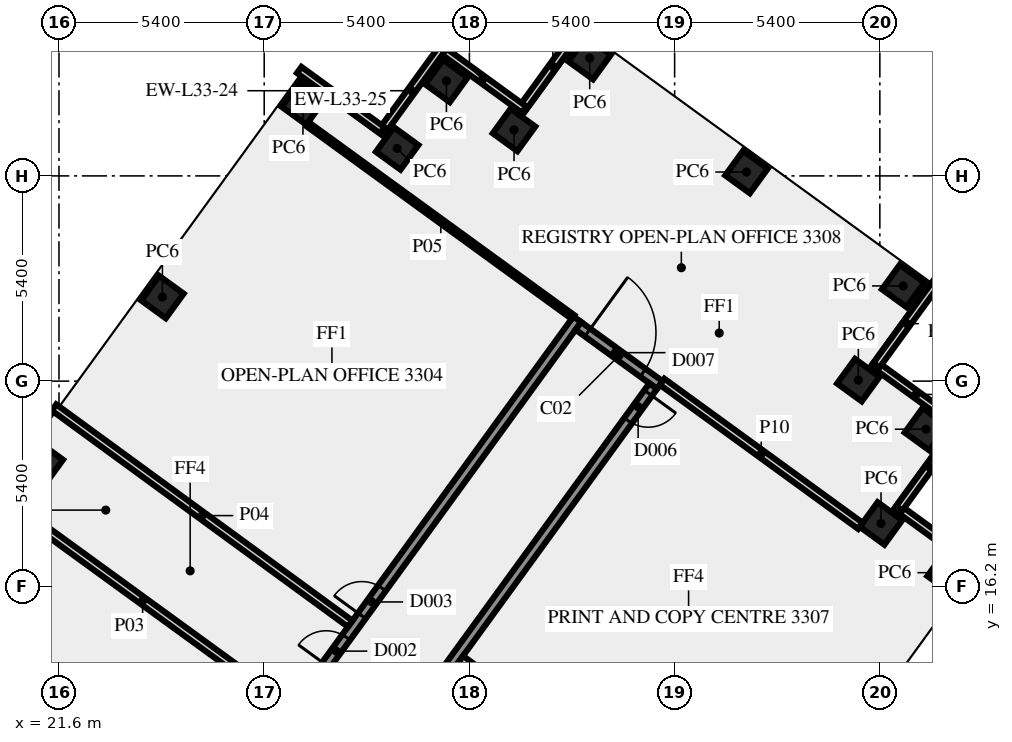
"""IFC4 building model, lengths in metres.
Left out: names, types, materials, properties, quantities, classifications, styles, units other than length and angle.
Written with IfcOpenShell. Run it as: python <this file> out.ifc"""

import sys

from ifc_helpers import new_model, si_unit, direction, frame, frame_2d, origin, origin_2d, place, context, subcontext, project, spatial, rectangle, extrude, element, fill, save


model = new_model("IFC4")
c1 = context("Model", 3, precision=1e-05, world=origin(), true_north=direction((0.0, 1.0)))
c2 = subcontext(c1, "Body", "Model", "MODEL_VIEW")
j1 = project(units=[si_unit("LENGTHUNIT", "METRE"), si_unit("PLANEANGLEUNIT", "RADIAN")], contexts=[c1])
p1 = place(None, origin())
s1 = spatial("IfcSite", under=j1, at=p1, CompositionType="ELEMENT")
p2 = place(p1, origin())
s2 = spatial("IfcBuilding", under=s1, at=p2, CompositionType="ELEMENT")
p3 = place(p2, frame((0.0, 0.0, 144.0)))
s3 = spatial("IfcBuildingStorey", under=s2, at=p3, CompositionType="ELEMENT", Elevation=144.0)
for number, where, z_axis, x_axis in (
    (1, (45.01, 16.56, 0.0), (0.0, 0.0, 1.0), (0.588, 0.809, 0.0)),
    (2, (43.231, 17.854, 0.0), (0.0, 0.0, 1.0), (0.588, 0.809, 0.0)),
    (3, (44.415, 20.335, 0.0), (0.0, 0.0, 1.0), (0.588, 0.809, 0.0)),
    (4, (42.635, 21.626, 0.0), (0.0, 0.0, 1.0), (-0.809, 0.588, 0.0)),
    (5, (43.815, 24.105, 0.0), (0.0, 0.0, 1.0), (-0.809, 0.588, 0.0)),
    (6, (39.691, 27.102, 0.0), (0.0, 0.0, 1.0), (-0.809, 0.588, 0.0)),
    (7, (35.565, 30.1, 0.0), (0.0, 0.0, 1.0), (-0.588, -0.809, 0.0)),
    (8, (33.574, 28.209, 0.0), (0.0, 0.0, 1.0), (-0.809, 0.588, 0.0)),
    (9, (31.795, 29.5, 0.0), (0.0, 0.0, 1.0), (-0.588, -0.809, 0.0)),
    (10, (30.499, 27.723, 0.0), (0.0, 0.0, 1.0), (-0.809, 0.588, 0.0)),
    (11, (28.02, 28.905, 0.0), (0.0, 0.0, 1.0), (-0.809, 0.588, 0.0)),
    (12, (24.321, 23.812, 0.0), (0.0, 0.0, 1.0), (-0.588, -0.809, 0.0)),
    (13, (21.147, 19.444, 0.0), (0.0, 0.0, 1.0), (-0.588, -0.809, 0.0)),
):
    element("IfcColumn", number, at=place(p3, frame(where, z_axis=z_axis, x_axis=x_axis)), inside=s3, PredefinedType="COLUMN", context=c2, shape_type="SweptSolid", body=[
        extrude(rectangle(XDim=0.8, YDim=0.8, at=origin_2d()), origin(), (0.0, 0.0, 1.0), 3.65),
    ])
for number, where, z_axis, x_axis in (
    (14, (45.842, 16.685, 0.0), (0.0, 0.0, 1.0), (-0.809, 0.588, 0.0)),
    (15, (43.709, 18.249, 0.0), (0.0, 0.0, 1.0), (0.588, 0.809, 0.0)),
    (16, (45.245, 20.456, 0.0), (0.0, 0.0, 1.0), (-0.809, 0.588, 0.0)),
    (17, (43.113, 22.02, 0.0), (0.0, 0.0, 1.0), (0.588, 0.809, 0.0)),
    (18, (35.388, 30.97, 0.0), (0.0, 0.0, 1.0), (-0.588, -0.809, 0.0)),
    (19, (33.838, 28.744, 0.0), (0.0, 0.0, 1.0), (-0.809, 0.588, 0.0)),
    (20, (31.67, 30.333, 0.0), (0.0, 0.0, 1.0), (-0.588, -0.809, 0.0)),
    (21, (30.106, 28.2, 0.0), (0.0, 0.0, 1.0), (-0.809, 0.588, 0.0)),
):
    element("IfcWall", number, at=place(p3, frame(where, z_axis=z_axis, x_axis=x_axis)), inside=s3, PredefinedType="SOLIDWALL", context=c2, shape_type="SweptSolid", body=[
        extrude(rectangle(XDim=2.7, YDim=0.2, at=frame_2d((1.35, 0.0))), origin(), (0.0, 0.0, 1.0), 3.65),
    ])
p4 = place(p3, frame((17.545, -1.125, 0.0), z_axis=(0.0, 0.0, 1.0), x_axis=(0.587786330937, 0.809016210693, 0.0)))
e22 = element("IfcWall", 22, at=p4, inside=s3, PredefinedType="SOLIDWALL", context=c2, shape_type="SweptSolid", body=[
    extrude(rectangle(XDim=30.103, YDim=0.25, at=frame_2d((15.052, 0.0))), origin(), (0.0, 0.0, 1.0), 3.65),
])
p5 = place(p4, frame((3.441, 0.0, 0.0)))
e23 = element("IfcOpeningElement", 23, at=p5, cuts=e22, PredefinedType="OPENING", context=c2, shape_type="SweptSolid", body=[
    extrude(rectangle(XDim=0.9, YDim=2.1, at=frame_2d((0.45, 1.05))), frame((0.0, 0.135, 0.0), z_axis=(0.0, -1.0, 0.0), x_axis=(1.0, 0.0, 0.0)), (0.0, 0.0, 1.0), 0.27),
])
p6 = place(p4, frame((20.457, 0.0, 0.0)))
e24 = element("IfcOpeningElement", 24, at=p6, cuts=e22, PredefinedType="OPENING", context=c2, shape_type="SweptSolid", body=[
    extrude(rectangle(XDim=0.9, YDim=2.1, at=frame_2d((0.45, 1.05))), frame((0.0, 0.135, 0.0), z_axis=(0.0, -1.0, 0.0), x_axis=(1.0, 0.0, 0.0)), (0.0, 0.0, 1.0), 0.27),
])
p7 = place(p4, frame((18.858, 0.0, 0.0)))
e25 = element("IfcOpeningElement", 25, at=p7, cuts=e22, PredefinedType="OPENING", context=c2, shape_type="SweptSolid", body=[
    extrude(rectangle(XDim=0.9, YDim=2.1, at=frame_2d((0.45, 1.05))), frame((0.0, 0.135, 0.0), z_axis=(0.0, -1.0, 0.0), x_axis=(1.0, 0.0, 0.0)), (0.0, 0.0, 1.0), 0.27),
])
p8 = place(p3, frame((35.267, 23.054, 0.0), z_axis=(0.0, 0.0, 1.0), x_axis=(0.809038743598, -0.587755315891, 0.0)))
e26 = element("IfcWall", 26, at=p8, inside=s3, PredefinedType="SOLIDWALL", context=c2, shape_type="SweptSolid", body=[
    extrude(rectangle(XDim=2.65, YDim=0.25, at=frame_2d((1.325, 0.0))), origin(), (0.0, 0.0, 1.0), 3.65),
])
p9 = place(p8, frame((0.3, 0.0, 0.0)))
e27 = element("IfcOpeningElement", 27, at=p9, cuts=e26, PredefinedType="OPENING", context=c2, shape_type="SweptSolid", body=[
    extrude(rectangle(XDim=1.8, YDim=2.1, at=frame_2d((0.9, 1.05))), frame((0.0, 0.135, 0.0), z_axis=(0.0, -1.0, 0.0), x_axis=(1.0, 0.0, 0.0)), (0.0, 0.0, 1.0), 0.27),
])
p10 = place(p3, frame((37.236, 21.469, 0.0), z_axis=(0.0, 0.0, 1.0), x_axis=(-0.58778344073, -0.809018310549, 0.0)))
e28 = element("IfcWall", 28, at=p10, inside=s3, PredefinedType="SOLIDWALL", context=c2, shape_type="SweptSolid", body=[
    extrude(rectangle(XDim=28.42, YDim=0.25, at=frame_2d((14.21, 0.0))), origin(), (0.0, 0.0, 1.0), 3.65),
])
p11 = place(p10, frame((26.988, 0.0, 0.0)))
e29 = element("IfcOpeningElement", 29, at=p11, cuts=e28, PredefinedType="OPENING", context=c2, shape_type="SweptSolid", body=[
    extrude(rectangle(XDim=0.9, YDim=2.1, at=frame_2d((0.45, 1.05))), frame((0.0, 0.135, 0.0), z_axis=(0.0, -1.0, 0.0), x_axis=(1.0, 0.0, 0.0)), (0.0, 0.0, 1.0), 0.27),
])
p12 = place(p10, frame((0.224, 0.0, 0.0)))
e30 = element("IfcOpeningElement", 30, at=p12, cuts=e28, PredefinedType="OPENING", context=c2, shape_type="SweptSolid", body=[
    extrude(rectangle(XDim=0.9, YDim=2.1, at=frame_2d((0.45, 1.05))), frame((0.0, 0.135, 0.0), z_axis=(0.0, -1.0, 0.0), x_axis=(1.0, 0.0, 0.0)), (0.0, 0.0, 1.0), 0.27),
])
p13 = place(p10, frame((9.155, 0.0, 0.0)))
e31 = element("IfcOpeningElement", 31, at=p13, cuts=e28, PredefinedType="OPENING", context=c2, shape_type="SweptSolid", body=[
    extrude(rectangle(XDim=0.9, YDim=2.1, at=frame_2d((0.45, 1.05))), frame((0.0, 0.135, 0.0), z_axis=(0.0, -1.0, 0.0), x_axis=(1.0, 0.0, 0.0)), (0.0, 0.0, 1.0), 0.27),
])
p14 = place(p3, frame((27.664, 13.016, 0.0), z_axis=(0.0, 0.0, 1.0), x_axis=(-0.80900684162, 0.587799226107, 0.0)))
e32 = element("IfcWall", 32, at=p14, inside=s3, PredefinedType="SOLIDWALL", context=c2, shape_type="SweptSolid", body=[
    extrude(rectangle(XDim=9.55, YDim=0.2, at=frame_2d((4.775, 0.0))), origin(), (0.0, 0.0, 1.0), 2.85),
])
p15 = place(p3, frame((21.469, 20.908, 0.0), z_axis=(0.0, 0.0, 1.0), x_axis=(0.807593618158, -0.589739389824, 0.0)))
e33 = element("IfcWall", 33, at=p15, inside=s3, PredefinedType="SOLIDWALL", context=c2, shape_type="SweptSolid", body=[
    extrude(rectangle(XDim=9.651, YDim=0.2, at=frame_2d((4.826, 0.0))), origin(), (0.0, 0.0, 1.0), 2.85),
])
p16 = place(p3, frame((35.126, 23.286, 0.0), z_axis=(0.0, 0.0, 1.0), x_axis=(-0.809030614944, 0.58776650473, 0.0)))
e34 = element("IfcWall", 34, at=p16, inside=s3, PredefinedType="PARTITIONING", context=c2, shape_type="SweptSolid", body=[
    extrude(rectangle(XDim=8.6, YDim=0.12, at=frame_2d((4.3, 0.0))), origin(), (0.0, 0.0, 1.0), 3.65),
])
p17 = place(p3, frame((42.686, 17.794, 0.0), z_axis=(0.0, 0.0, 1.0), x_axis=(-0.809017755079, 0.587784205272, 0.0)))
e35 = element("IfcWall", 35, at=p17, inside=s3, PredefinedType="SOLIDWALL", context=c2, shape_type="SweptSolid", body=[
    extrude(rectangle(XDim=6.445, YDim=0.2, at=frame_2d((3.222, 0.0))), origin(), (0.0, 0.0, 1.0), 3.65),
])
p18 = place(p3, frame((32.174, 14.288, 0.0), z_axis=(0.0, 0.0, 1.0), x_axis=(0.807664588563, -0.589642190131, 0.0)))
e36 = element("IfcWall", 36, at=p18, inside=s3, PredefinedType="SOLIDWALL", context=c2, shape_type="SweptSolid", body=[
    extrude(rectangle(XDim=9.55, YDim=0.2, at=frame_2d((4.775, 0.0))), origin(), (0.0, 0.0, 1.0), 2.85),
])
p19 = place(p6, origin())
e37 = element("IfcDoor", 37, at=p19, inside=s3, OperationType="SINGLE_SWING_LEFT", PredefinedType="DOOR", context=c2, shape_type="SweptSolid", body=[
    extrude(rectangle(XDim=0.9, YDim=2.1, at=frame_2d((0.45, 1.05))), frame((0.0, 0.025, 0.0), z_axis=(0.0, -1.0, 0.0), x_axis=(1.0, 0.0, 0.0)), (0.0, 0.0, 1.0), 0.05),
])
fill(e24, e37)
p20 = place(p7, origin())
e38 = element("IfcDoor", 38, at=p20, inside=s3, OperationType="SINGLE_SWING_RIGHT", PredefinedType="DOOR", context=c2, shape_type="SweptSolid", body=[
    extrude(rectangle(XDim=0.9, YDim=2.1, at=frame_2d((0.45, 1.05))), frame((0.0, 0.025, 0.0), z_axis=(0.0, -1.0, 0.0), x_axis=(1.0, 0.0, 0.0)), (0.0, 0.0, 1.0), 0.05),
])
fill(e25, e38)
p21 = place(p12, origin())
e39 = element("IfcDoor", 39, at=p21, inside=s3, OperationType="SINGLE_SWING_LEFT", PredefinedType="DOOR", context=c2, shape_type="SweptSolid", body=[
    extrude(rectangle(XDim=0.9, YDim=2.1, at=frame_2d((0.45, 1.05))), frame((0.0, 0.025, 0.0), z_axis=(0.0, -1.0, 0.0), x_axis=(1.0, 0.0, 0.0)), (0.0, 0.0, 1.0), 0.05),
])
fill(e30, e39)
p22 = place(p9, origin())
e40 = element("IfcDoor", 40, at=p22, inside=s3, OperationType="DOUBLE_DOOR_SINGLE_SWING", PredefinedType="DOOR", context=c2, shape_type="SweptSolid", body=[
    extrude(rectangle(XDim=1.8, YDim=2.1, at=frame_2d((0.9, 1.05))), frame((0.0, 0.025, 0.0), z_axis=(0.0, -1.0, 0.0), x_axis=(1.0, 0.0, 0.0)), (0.0, 0.0, 1.0), 0.05),
])
fill(e27, e40)
save(model, sys.argv[1])
